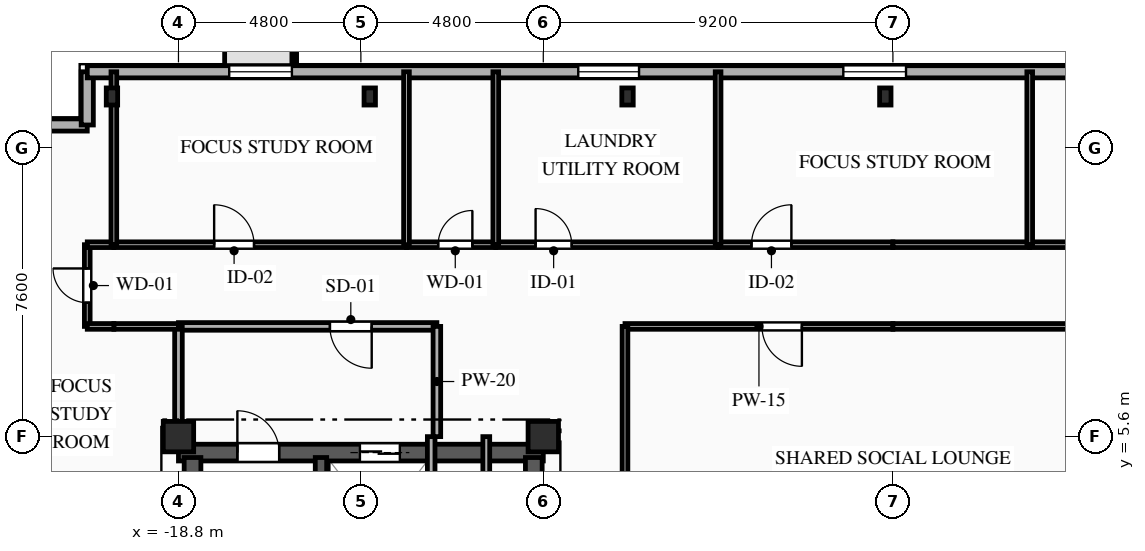
"""IFC4 building model, lengths in metres.
Left out: names, types, materials, properties, quantities, classifications, styles, units other than length and angle.
Written with IfcOpenShell. Run it as: python <this file> out.ifc"""

import sys

from ifc_helpers import new_model, si_unit, direction, frame, frame_2d, origin, origin_2d, place, context, subcontext, project, spatial, rectangle, i_section, extrude, element, fill, save


model = new_model("IFC4")
c1 = context("Model", 3, precision=1e-05, world=origin(), true_north=direction((0.0, 1.0)))
c2 = subcontext(c1, "Body", "Model", "MODEL_VIEW")
j1 = project(units=[si_unit("LENGTHUNIT", "METRE"), si_unit("PLANEANGLEUNIT", "RADIAN")], contexts=[c1])
p1 = place(None, origin())
s1 = spatial("IfcSite", under=j1, at=p1, CompositionType="ELEMENT")
p2 = place(p1, origin())
s2 = spatial("IfcBuilding", under=s1, at=p2, CompositionType="ELEMENT")
p3 = place(p2, frame((0.0, 0.0, 258.45)))
s3 = spatial("IfcBuildingStorey", under=s2, at=p3, CompositionType="ELEMENT", Elevation=258.45)
for number, where, z_axis, x_axis in (
    (1, (-18.8, 5.6, 0.0), (0.0, 0.0, 1.0), (1.0, 0.0, 0.0)),
    (2, (-9.2, 5.6, 0.0), (0.0, 0.0, 1.0), (1.0, 0.0, 0.0)),
):
    element("IfcColumn", number, at=place(p3, frame(where, z_axis=z_axis, x_axis=x_axis)), inside=s3, PredefinedType="COLUMN", context=c2, shape_type="SweptSolid", body=[
        extrude(rectangle(XDim=0.8, YDim=0.8, at=origin_2d()), origin(), (0.0, 0.0, 1.0), 3.35),
    ])
for number, where, z_axis, x_axis in (
    (3, (-0.2, 14.55, 0.0), (0.0, 0.0, 1.0), (1.0, 0.0, 0.0)),
    (4, (-6.983, 14.55, 0.0), (0.0, 0.0, 1.0), (1.0, 0.0, 0.0)),
    (5, (-13.767, 14.55, 0.0), (0.0, 0.0, 1.0), (1.0, 0.0, 0.0)),
    (6, (-20.55, 14.55, 0.0), (0.0, 0.0, 1.0), (1.0, 0.0, 0.0)),
):
    element("IfcColumn", number, at=place(p3, frame(where, z_axis=z_axis, x_axis=x_axis)), inside=s3, PredefinedType="COLUMN", context=c2, shape_type="SweptSolid", body=[
        extrude(i_section(OverallWidth=0.3, OverallDepth=0.45, WebThickness=0.014, FlangeThickness=0.026, FilletRadius=0.027, at=origin_2d()), origin(), (0.0, 0.0, 1.0), 3.35),
    ])
p4 = place(p3, frame((-22.6, 13.8, 0.0), z_axis=(0.0, 0.0, 1.0), x_axis=(1.0, 0.0, 0.0)))
e7 = element("IfcWall", 7, at=p4, inside=s3, PredefinedType="SOLIDWALL", context=c2, shape_type="SweptSolid", body=[
    extrude(rectangle(XDim=1.4, YDim=0.32, at=frame_2d((0.7, 0.0))), origin(), (0.0, 0.0, 1.0), 3.03),
])
p5 = place(p3, frame((-21.2, 13.8, 0.0), z_axis=(0.0, 0.0, 1.0), x_axis=(0.0, 1.0, 0.0)))
e8 = element("IfcWall", 8, at=p5, inside=s3, PredefinedType="SOLIDWALL", context=c2, shape_type="SweptSolid", body=[
    extrude(rectangle(XDim=1.4, YDim=0.32, at=frame_2d((0.7, 0.0))), origin(), (0.0, 0.0, 1.0), 3.03),
])
p6 = place(p3, frame((-21.2, 15.2, 0.0), z_axis=(0.0, 0.0, 1.0), x_axis=(1.0, 0.0, 0.0)))
e9 = element("IfcWall", 9, at=p6, inside=s3, PredefinedType="SOLIDWALL", context=c2, shape_type="SweptSolid", body=[
    extrude(rectangle(XDim=42.0, YDim=0.32, at=frame_2d((21.0, 0.0))), origin(), (0.0, 0.0, 1.0), 3.03),
])
p7 = place(p6, frame((3.735, 0.0, 0.85)))
e10 = element("IfcOpeningElement", 10, at=p7, cuts=e9, PredefinedType="OPENING", context=c2, shape_type="SweptSolid", body=[
    extrude(rectangle(XDim=1.65, YDim=1.85, at=frame_2d((0.825, 0.925))), frame((0.0, 0.17, 0.0), z_axis=(0.0, -1.0, 0.0), x_axis=(1.0, 0.0, 0.0)), (0.0, 0.0, 1.0), 0.34),
])
p8 = place(p6, frame((12.92, 0.0, 0.85)))
e11 = element("IfcOpeningElement", 11, at=p8, cuts=e9, PredefinedType="OPENING", context=c2, shape_type="SweptSolid", body=[
    extrude(rectangle(XDim=1.6, YDim=1.85, at=frame_2d((0.8, 0.925))), frame((0.0, 0.17, 0.0), z_axis=(0.0, -1.0, 0.0), x_axis=(1.0, 0.0, 0.0)), (0.0, 0.0, 1.0), 0.34),
])
p9 = place(p6, frame((19.895, 0.0, 0.85)))
e12 = element("IfcOpeningElement", 12, at=p9, cuts=e9, PredefinedType="OPENING", context=c2, shape_type="SweptSolid", body=[
    extrude(rectangle(XDim=1.65, YDim=1.85, at=frame_2d((0.825, 0.925))), frame((0.0, 0.17, 0.0), z_axis=(0.0, -1.0, 0.0), x_axis=(1.0, 0.0, 0.0)), (0.0, 0.0, 1.0), 0.34),
])
p10 = place(p6, frame((28.095, 0.0, 0.85)))
e13 = element("IfcOpeningElement", 13, at=p10, cuts=e9, PredefinedType="OPENING", context=c2, shape_type="SweptSolid", body=[
    extrude(rectangle(XDim=1.65, YDim=1.85, at=frame_2d((0.825, 0.925))), frame((0.0, 0.17, 0.0), z_axis=(0.0, -1.0, 0.0), x_axis=(1.0, 0.0, 0.0)), (0.0, 0.0, 1.0), 0.34),
])
p11 = place(p6, frame((36.495, 0.0, 0.85)))
e14 = element("IfcOpeningElement", 14, at=p11, cuts=e9, PredefinedType="OPENING", context=c2, shape_type="SweptSolid", body=[
    extrude(rectangle(XDim=1.65, YDim=1.85, at=frame_2d((0.825, 0.925))), frame((0.0, 0.17, 0.0), z_axis=(0.0, -1.0, 0.0), x_axis=(1.0, 0.0, 0.0)), (0.0, 0.0, 1.0), 0.34),
])
p12 = place(p3, frame((-18.8, 5.18, 0.0), z_axis=(0.0, 0.0, 1.0), x_axis=(1.0, 0.0, 0.0)))
e15 = element("IfcWall", 15, at=p12, inside=s3, PredefinedType="SHEAR", context=c2, shape_type="SweptSolid", body=[
    extrude(rectangle(XDim=9.6, YDim=0.44, at=frame_2d((4.8, 0.0))), origin(), (0.0, 0.0, 1.0), 3.03),
])
p13 = place(p12, frame((1.55, 0.0, 0.0)))
e16 = element("IfcOpeningElement", 16, at=p13, cuts=e15, PredefinedType="OPENING", context=c2, shape_type="SweptSolid", body=[
    extrude(rectangle(XDim=1.1, YDim=2.15, at=frame_2d((0.55, 1.075))), frame((0.0, 0.23, 0.0), z_axis=(0.0, -1.0, 0.0), x_axis=(1.0, 0.0, 0.0)), (0.0, 0.0, 1.0), 0.46),
])
p14 = place(p12, frame((4.775, 0.0, 0.0)))
e17 = element("IfcOpeningElement", 17, at=p14, cuts=e15, PredefinedType="OPENING", context=c2, shape_type="SweptSolid", body=[
    extrude(rectangle(XDim=1.05, YDim=2.1, at=frame_2d((0.525, 1.05))), frame((0.0, 0.23, 0.0), z_axis=(0.0, -1.0, 0.0), x_axis=(1.0, 0.0, 0.0)), (0.0, 0.0, 1.0), 0.46),
])
p15 = place(p3, frame((-18.43, -5.05, 0.0), z_axis=(0.0, 0.0, 1.0), x_axis=(0.0, 1.0, 0.0)))
e18 = element("IfcWall", 18, at=p15, inside=s3, PredefinedType="SHEAR", context=c2, shape_type="SweptSolid", body=[
    extrude(rectangle(XDim=10.1, YDim=0.44, at=frame_2d((5.05, 0.0))), origin(), (0.0, 0.0, 1.0), 3.03),
])
p16 = place(p3, frame((-9.45, -5.05, 0.0), z_axis=(0.0, 0.0, 1.0), x_axis=(0.0, 1.0, 0.0)))
e19 = element("IfcWall", 19, at=p16, inside=s3, PredefinedType="SHEAR", context=c2, shape_type="SweptSolid", body=[
    extrude(rectangle(XDim=10.1, YDim=0.44, at=frame_2d((5.05, 0.0))), origin(), (0.0, 0.0, 1.0), 3.03),
])
p17 = place(p16, frame((7.15, 0.0, 0.0)))
e20 = element("IfcOpeningElement", 20, at=p17, cuts=e19, PredefinedType="OPENING", context=c2, shape_type="SweptSolid", body=[
    extrude(rectangle(XDim=0.9, YDim=2.1, at=frame_2d((0.45, 1.05))), frame((0.0, 0.23, 0.0), z_axis=(0.0, -1.0, 0.0), x_axis=(1.0, 0.0, 0.0)), (0.0, 0.0, 1.0), 0.46),
])
p18 = place(p16, frame((2.4, 0.0, 0.0)))
e21 = element("IfcOpeningElement", 21, at=p18, cuts=e19, PredefinedType="OPENING", context=c2, shape_type="SweptSolid", body=[
    extrude(rectangle(XDim=1.2, YDim=2.15, at=frame_2d((0.6, 1.075))), frame((0.0, 0.23, 0.0), z_axis=(0.0, -1.0, 0.0), x_axis=(1.0, 0.0, 0.0)), (0.0, 0.0, 1.0), 0.46),
])
p19 = place(p16, frame((0.35, 0.0, 0.0)))
e22 = element("IfcOpeningElement", 22, at=p19, cuts=e19, PredefinedType="OPENING", context=c2, shape_type="SweptSolid", body=[
    extrude(rectangle(XDim=0.9, YDim=2.1, at=frame_2d((0.45, 1.05))), frame((0.0, 0.23, 0.0), z_axis=(0.0, -1.0, 0.0), x_axis=(1.0, 0.0, 0.0)), (0.0, 0.0, 1.0), 0.46),
])
p20 = place(p16, frame((5.0, 0.0, 0.0)))
e23 = element("IfcOpeningElement", 23, at=p20, cuts=e19, PredefinedType="OPENING", context=c2, shape_type="SweptSolid", body=[
    extrude(rectangle(XDim=0.9, YDim=2.1, at=frame_2d((0.45, 1.05))), frame((0.0, 0.23, 0.0), z_axis=(0.0, -1.0, 0.0), x_axis=(1.0, 0.0, 0.0)), (0.0, 0.0, 1.0), 0.46),
])
p21 = place(p3, frame((-15.05, -5.05, 0.0), z_axis=(0.0, 0.0, 1.0), x_axis=(0.0, 1.0, 0.0)))
e24 = element("IfcWall", 24, at=p21, inside=s3, PredefinedType="SHEAR", context=c2, shape_type="SweptSolid", body=[
    extrude(rectangle(XDim=10.1, YDim=0.3, at=frame_2d((5.05, 0.0))), origin(), (0.0, 0.0, 1.0), 3.03),
])
p22 = place(p3, frame((-12.15, 1.55, 0.0), z_axis=(0.0, 0.0, 1.0), x_axis=(0.0, 1.0, 0.0)))
e25 = element("IfcWall", 25, at=p22, inside=s3, PredefinedType="PARTITIONING", context=c2, shape_type="SweptSolid", body=[
    extrude(rectangle(XDim=4.05, YDim=0.2, at=frame_2d((2.025, 0.0))), origin(), (0.0, 0.0, 1.0), 3.03),
])
p23 = place(p3, frame((-12.0, 8.5, 0.0), z_axis=(0.0, 0.0, 1.0), x_axis=(-1.0, 0.0, 0.0)))
e26 = element("IfcWall", 26, at=p23, inside=s3, PredefinedType="PARTITIONING", context=c2, shape_type="SweptSolid", body=[
    extrude(rectangle(XDim=6.8, YDim=0.2, at=frame_2d((3.4, 0.0))), origin(), (0.0, 0.0, 1.0), 3.03),
])
p24 = place(p23, frame((1.715, 0.0, 0.0)))
e27 = element("IfcOpeningElement", 27, at=p24, cuts=e26, PredefinedType="OPENING", context=c2, shape_type="SweptSolid", body=[
    extrude(rectangle(XDim=1.1, YDim=2.15, at=frame_2d((0.55, 1.075))), frame((0.0, 0.11, 0.0), z_axis=(0.0, -1.0, 0.0), x_axis=(1.0, 0.0, 0.0)), (0.0, 0.0, 1.0), 0.22),
])
p25 = place(p3, frame((-12.0, 5.6, 0.0), z_axis=(0.0, 0.0, 1.0), x_axis=(0.0, 1.0, 0.0)))
e28 = element("IfcWall", 28, at=p25, inside=s3, PredefinedType="PARTITIONING", context=c2, shape_type="SweptSolid", body=[
    extrude(rectangle(XDim=2.9, YDim=0.2, at=frame_2d((1.45, 0.0))), origin(), (0.0, 0.0, 1.0), 3.03),
])
p26 = place(p3, frame((-18.8, 8.5, 0.0), z_axis=(0.0, 0.0, 1.0), x_axis=(0.0, -1.0, 0.0)))
e29 = element("IfcWall", 29, at=p26, inside=s3, PredefinedType="PARTITIONING", context=c2, shape_type="SweptSolid", body=[
    extrude(rectangle(XDim=2.9, YDim=0.2, at=frame_2d((1.45, 0.0))), origin(), (0.0, 0.0, 1.0), 2.655),
])
p27 = place(p3, frame((-10.7, 5.6, 0.0), z_axis=(0.0, 0.0, 1.0), x_axis=(0.0, -1.0, 0.0)))
e30 = element("IfcWall", 30, at=p27, inside=s3, PredefinedType="PARTITIONING", context=c2, shape_type="SweptSolid", body=[
    extrude(rectangle(XDim=4.05, YDim=0.18, at=frame_2d((2.025, 0.0))), origin(), (0.0, 0.0, 1.0), 3.03),
])
p28 = place(p27, frame((1.325, 0.0, 0.0)))
e31 = element("IfcOpeningElement", 31, at=p28, cuts=e30, PredefinedType="OPENING", context=c2, shape_type="SweptSolid", body=[
    extrude(rectangle(XDim=1.25, YDim=2.2, at=frame_2d((0.625, 1.1))), frame((0.0, 0.1, 0.0), z_axis=(0.0, -1.0, 0.0), x_axis=(1.0, 0.0, 0.0)), (0.0, 0.0, 1.0), 0.2),
])
p29 = place(p3, frame((-21.2, 8.5, 0.0), z_axis=(0.0, 0.0, 1.0), x_axis=(0.0, 1.0, 0.0)))
e32 = element("IfcWall", 32, at=p29, inside=s3, PredefinedType="PARTITIONING", context=c2, shape_type="SweptSolid", body=[
    extrude(rectangle(XDim=2.15, YDim=0.15, at=frame_2d((1.075, 0.0))), origin(), (0.0, 0.0, 1.0), 2.685),
])
p30 = place(p29, frame((0.625, 0.0, 0.0)))
e33 = element("IfcOpeningElement", 33, at=p30, cuts=e32, PredefinedType="OPENING", context=c2, shape_type="SweptSolid", body=[
    extrude(rectangle(XDim=0.9, YDim=2.1, at=frame_2d((0.45, 1.05))), frame((0.0, 0.085, 0.0), z_axis=(0.0, -1.0, 0.0), x_axis=(1.0, 0.0, 0.0)), (0.0, 0.0, 1.0), 0.17),
])
p31 = place(p3, frame((-18.8, 8.5, 0.0), z_axis=(0.0, 0.0, 1.0), x_axis=(-1.0, 0.0, 0.0)))
e34 = element("IfcWall", 34, at=p31, inside=s3, PredefinedType="PARTITIONING", context=c2, shape_type="SweptSolid", body=[
    extrude(rectangle(XDim=1.7, YDim=0.15, at=frame_2d((0.85, 0.0))), origin(), (0.0, 0.0, 1.0), 3.03),
])
for number, where, z_axis, x_axis in (
    (35, (-20.5, 8.5, 0.0), (0.0, 0.0, 1.0), (-1.0, 0.0, 0.0)),
    (36, (-21.2, 10.65, 0.0), (0.0, 0.0, 1.0), (1.0, 0.0, 0.0)),
):
    element("IfcWall", number, at=place(p3, frame(where, z_axis=z_axis, x_axis=x_axis)), inside=s3, PredefinedType="PARTITIONING", context=c2, shape_type="SweptSolid", body=[
        extrude(rectangle(XDim=0.7, YDim=0.15, at=frame_2d((0.35, 0.0))), origin(), (0.0, 0.0, 1.0), 3.03),
    ])
p32 = place(p3, frame((-20.5, 10.65, 0.0), z_axis=(0.0, 0.0, 1.0), x_axis=(1.0, 0.0, 0.0)))
e37 = element("IfcWall", 37, at=p32, inside=s3, PredefinedType="PARTITIONING", context=c2, shape_type="SweptSolid", body=[
    extrude(rectangle(XDim=7.7, YDim=0.15, at=frame_2d((3.85, 0.0))), origin(), (0.0, 0.0, 1.0), 3.03),
])
p33 = place(p32, frame((2.639, 0.0, 0.0)))
e38 = element("IfcOpeningElement", 38, at=p33, cuts=e37, PredefinedType="OPENING", context=c2, shape_type="SweptSolid", body=[
    extrude(rectangle(XDim=1.05, YDim=2.15, at=frame_2d((0.525, 1.075))), frame((0.0, 0.085, 0.0), z_axis=(0.0, -1.0, 0.0), x_axis=(1.0, 0.0, 0.0)), (0.0, 0.0, 1.0), 0.17),
])
p34 = place(p3, frame((-12.8, 10.65, 0.0), z_axis=(0.0, 0.0, 1.0), x_axis=(1.0, 0.0, 0.0)))
e39 = element("IfcWall", 39, at=p34, inside=s3, PredefinedType="PLUMBINGWALL", context=c2, shape_type="SweptSolid", body=[
    extrude(rectangle(XDim=2.35, YDim=0.15, at=frame_2d((1.175, 0.0))), origin(), (0.0, 0.0, 1.0), 3.03),
])
p35 = place(p34, frame((0.834, 0.0, 0.0)))
e40 = element("IfcOpeningElement", 40, at=p35, cuts=e39, PredefinedType="OPENING", context=c2, shape_type="SweptSolid", body=[
    extrude(rectangle(XDim=0.9, YDim=2.1, at=frame_2d((0.45, 1.05))), frame((0.0, 0.085, 0.0), z_axis=(0.0, -1.0, 0.0), x_axis=(1.0, 0.0, 0.0)), (0.0, 0.0, 1.0), 0.17),
])
p36 = place(p3, frame((-10.45, 10.65, 0.0), z_axis=(0.0, 0.0, 1.0), x_axis=(1.0, 0.0, 0.0)))
e41 = element("IfcWall", 41, at=p36, inside=s3, PredefinedType="PARTITIONING", context=c2, shape_type="SweptSolid", body=[
    extrude(rectangle(XDim=5.85, YDim=0.15, at=frame_2d((2.925, 0.0))), origin(), (0.0, 0.0, 1.0), 3.03),
])
p37 = place(p36, frame((1.048, 0.0, 0.0)))
e42 = element("IfcOpeningElement", 42, at=p37, cuts=e41, PredefinedType="OPENING", context=c2, shape_type="SweptSolid", body=[
    extrude(rectangle(XDim=0.95, YDim=2.1, at=frame_2d((0.475, 1.05))), frame((0.0, 0.085, 0.0), z_axis=(0.0, -1.0, 0.0), x_axis=(1.0, 0.0, 0.0)), (0.0, 0.0, 1.0), 0.17),
])
p38 = place(p3, frame((-4.6, 10.65, 0.0), z_axis=(0.0, 0.0, 1.0), x_axis=(1.0, 0.0, 0.0)))
e43 = element("IfcWall", 43, at=p38, inside=s3, PredefinedType="PARTITIONING", context=c2, shape_type="SweptSolid", body=[
    extrude(rectangle(XDim=4.6, YDim=0.15, at=frame_2d((2.3, 0.0))), origin(), (0.0, 0.0, 1.0), 3.03),
])
p39 = place(p38, frame((0.879, 0.0, 0.0)))
e44 = element("IfcOpeningElement", 44, at=p39, cuts=e43, PredefinedType="OPENING", context=c2, shape_type="SweptSolid", body=[
    extrude(rectangle(XDim=1.05, YDim=2.15, at=frame_2d((0.525, 1.075))), frame((0.0, 0.085, 0.0), z_axis=(0.0, -1.0, 0.0), x_axis=(1.0, 0.0, 0.0)), (0.0, 0.0, 1.0), 0.17),
])
p40 = place(p3, frame((0.0, 8.5, 0.0), z_axis=(0.0, 0.0, 1.0), x_axis=(-1.0, 0.0, 0.0)))
e45 = element("IfcWall", 45, at=p40, inside=s3, PredefinedType="PARTITIONING", context=c2, shape_type="SweptSolid", body=[
    extrude(rectangle(XDim=7.05, YDim=0.15, at=frame_2d((3.525, 0.0))), origin(), (0.0, 0.0, 1.0), 3.03),
])
p41 = place(p40, frame((2.395, 0.0, 0.0)))
e46 = element("IfcOpeningElement", 46, at=p41, cuts=e45, PredefinedType="OPENING", context=c2, shape_type="SweptSolid", body=[
    extrude(rectangle(XDim=1.05, YDim=2.15, at=frame_2d((0.525, 1.075))), frame((0.0, 0.085, 0.0), z_axis=(0.0, -1.0, 0.0), x_axis=(1.0, 0.0, 0.0)), (0.0, 0.0, 1.0), 0.17),
])
p42 = place(p3, frame((0.0, 10.65, 0.0), z_axis=(0.0, 0.0, 1.0), x_axis=(1.0, 0.0, 0.0)))
e47 = element("IfcWall", 47, at=p42, inside=s3, PredefinedType="PARTITIONING", context=c2, shape_type="SweptSolid", body=[
    extrude(rectangle(XDim=3.6, YDim=0.15, at=frame_2d((1.8, 0.0))), origin(), (0.0, 0.0, 1.0), 3.03),
])
p43 = place(p3, frame((3.6, 10.65, 0.0), z_axis=(0.0, 0.0, 1.0), x_axis=(1.0, 0.0, 0.0)))
e48 = element("IfcWall", 48, at=p43, inside=s3, PredefinedType="PARTITIONING", context=c2, shape_type="SweptSolid", body=[
    extrude(rectangle(XDim=8.2, YDim=0.15, at=frame_2d((4.1, 0.0))), origin(), (0.0, 0.0, 1.0), 3.03),
])
p44 = place(p43, frame((5.821, 0.0, 0.0)))
e49 = element("IfcOpeningElement", 49, at=p44, cuts=e48, PredefinedType="OPENING", context=c2, shape_type="SweptSolid", body=[
    extrude(rectangle(XDim=1.05, YDim=2.15, at=frame_2d((0.525, 1.075))), frame((0.0, 0.085, 0.0), z_axis=(0.0, -1.0, 0.0), x_axis=(1.0, 0.0, 0.0)), (0.0, 0.0, 1.0), 0.17),
])
for number, where, z_axis, x_axis in (
    (50, (7.05, 8.5, 0.0), (0.0, 0.0, 1.0), (-1.0, 0.0, 0.0)),
    (51, (-7.05, 8.5, 0.0), (0.0, 0.0, 1.0), (0.0, -1.0, 0.0)),
):
    element("IfcWall", number, at=place(p3, frame(where, z_axis=z_axis, x_axis=x_axis)), inside=s3, PredefinedType="PARTITIONING", context=c2, shape_type="SweptSolid", body=[
        extrude(rectangle(XDim=7.05, YDim=0.15, at=frame_2d((3.525, 0.0))), origin(), (0.0, 0.0, 1.0), 3.03),
    ])
p45 = place(p3, frame((-20.5, 15.2, 0.0), z_axis=(0.0, 0.0, 1.0), x_axis=(0.0, -1.0, 0.0)))
e52 = element("IfcWall", 52, at=p45, inside=s3, PredefinedType="PARTITIONING", context=c2, shape_type="SweptSolid", body=[
    extrude(rectangle(XDim=4.55, YDim=0.15, at=frame_2d((2.275, 0.0))), origin(), (0.0, 0.0, 1.0), 2.655),
])
for number, where, z_axis, x_axis in (
    (53, (-12.8, 15.2, 0.0), (0.0, 0.0, 1.0), (0.0, -1.0, 0.0)),
    (54, (-10.45, 15.2, 0.0), (0.0, 0.0, 1.0), (0.0, -1.0, 0.0)),
):
    element("IfcWall", number, at=place(p3, frame(where, z_axis=z_axis, x_axis=x_axis)), inside=s3, PredefinedType="PLUMBINGWALL", context=c2, shape_type="SweptSolid", body=[
        extrude(rectangle(XDim=4.55, YDim=0.15, at=frame_2d((2.275, 0.0))), origin(), (0.0, 0.0, 1.0), 3.03),
    ])
for number, where, z_axis, x_axis in (
    (55, (-4.6, 15.2, 0.0), (0.0, 0.0, 1.0), (0.0, -1.0, 0.0)),
    (56, (3.6, 15.2, 0.0), (0.0, 0.0, 1.0), (0.0, -1.0, 0.0)),
):
    element("IfcWall", number, at=place(p3, frame(where, z_axis=z_axis, x_axis=x_axis)), inside=s3, PredefinedType="PARTITIONING", context=c2, shape_type="SweptSolid", body=[
        extrude(rectangle(XDim=4.55, YDim=0.15, at=frame_2d((2.275, 0.0))), origin(), (0.0, 0.0, 1.0), 3.03),
    ])
p46 = place(p7, origin())
e57 = element("IfcWindow", 57, at=p46, inside=s3, PartitioningType="SINGLE_PANEL", PredefinedType="WINDOW", context=c2, shape_type="SweptSolid", body=[
    extrude(rectangle(XDim=1.65, YDim=1.85, at=frame_2d((0.825, 0.925))), frame((0.0, 0.03, 0.0), z_axis=(0.0, -1.0, 0.0), x_axis=(1.0, 0.0, 0.0)), (0.0, 0.0, 1.0), 0.06),
])
fill(e10, e57)
p47 = place(p8, origin())
e58 = element("IfcWindow", 58, at=p47, inside=s3, PartitioningType="SINGLE_PANEL", PredefinedType="WINDOW", context=c2, shape_type="SweptSolid", body=[
    extrude(rectangle(XDim=1.6, YDim=1.85, at=frame_2d((0.8, 0.925))), frame((0.0, 0.03, 0.0), z_axis=(0.0, -1.0, 0.0), x_axis=(1.0, 0.0, 0.0)), (0.0, 0.0, 1.0), 0.06),
])
fill(e11, e58)
p48 = place(p9, origin())
e59 = element("IfcWindow", 59, at=p48, inside=s3, PartitioningType="SINGLE_PANEL", PredefinedType="WINDOW", context=c2, shape_type="SweptSolid", body=[
    extrude(rectangle(XDim=1.65, YDim=1.85, at=frame_2d((0.825, 0.925))), frame((0.0, 0.03, 0.0), z_axis=(0.0, -1.0, 0.0), x_axis=(1.0, 0.0, 0.0)), (0.0, 0.0, 1.0), 0.06),
])
fill(e12, e59)
p49 = place(p13, origin())
e60 = element("IfcDoor", 60, at=p49, inside=s3, OperationType="SINGLE_SWING_LEFT", PredefinedType="DOOR", context=c2, shape_type="SweptSolid", body=[
    extrude(rectangle(XDim=1.1, YDim=2.15, at=frame_2d((0.55, 1.075))), frame((0.0, 0.025, 0.0), z_axis=(0.0, -1.0, 0.0), x_axis=(1.0, 0.0, 0.0)), (0.0, 0.0, 1.0), 0.05),
])
fill(e16, e60)
p50 = place(p14, origin())
e61 = element("IfcDoor", 61, at=p50, inside=s3, OperationType="DOUBLE_DOOR_SLIDING", PredefinedType="DOOR", context=c2, shape_type="SweptSolid", body=[
    extrude(rectangle(XDim=1.05, YDim=2.1, at=frame_2d((0.525, 1.05))), frame((0.0, 0.025, 0.0), z_axis=(0.0, -1.0, 0.0), x_axis=(1.0, 0.0, 0.0)), (0.0, 0.0, 1.0), 0.05),
])
fill(e17, e61)
p51 = place(p24, origin())
e62 = element("IfcDoor", 62, at=p51, inside=s3, OperationType="SINGLE_SWING_LEFT", PredefinedType="DOOR", context=c2, shape_type="SweptSolid", body=[
    extrude(rectangle(XDim=1.1, YDim=2.15, at=frame_2d((0.55, 1.075))), frame((0.0, 0.025, 0.0), z_axis=(0.0, -1.0, 0.0), x_axis=(1.0, 0.0, 0.0)), (0.0, 0.0, 1.0), 0.05),
])
fill(e27, e62)
p52 = place(p30, origin())
e63 = element("IfcDoor", 63, at=p52, inside=s3, OperationType="SINGLE_SWING_RIGHT", PredefinedType="DOOR", context=c2, shape_type="SweptSolid", body=[
    extrude(rectangle(XDim=0.9, YDim=2.1, at=frame_2d((0.45, 1.05))), frame((0.0, 0.025, 0.0), z_axis=(0.0, -1.0, 0.0), x_axis=(1.0, 0.0, 0.0)), (0.0, 0.0, 1.0), 0.05),
])
fill(e33, e63)
p53 = place(p33, origin())
e64 = element("IfcDoor", 64, at=p53, inside=s3, OperationType="SINGLE_SWING_LEFT", PredefinedType="DOOR", context=c2, shape_type="SweptSolid", body=[
    extrude(rectangle(XDim=1.05, YDim=2.15, at=frame_2d((0.525, 1.075))), frame((0.0, 0.025, 0.0), z_axis=(0.0, -1.0, 0.0), x_axis=(1.0, 0.0, 0.0)), (0.0, 0.0, 1.0), 0.05),
])
fill(e38, e64)
p54 = place(p35, origin())
e65 = element("IfcDoor", 65, at=p54, inside=s3, OperationType="SINGLE_SWING_RIGHT", PredefinedType="DOOR", context=c2, shape_type="SweptSolid", body=[
    extrude(rectangle(XDim=0.9, YDim=2.1, at=frame_2d((0.45, 1.05))), frame((0.0, 0.025, 0.0), z_axis=(0.0, -1.0, 0.0), x_axis=(1.0, 0.0, 0.0)), (0.0, 0.0, 1.0), 0.05),
])
fill(e40, e65)
p55 = place(p37, origin())
e66 = element("IfcDoor", 66, at=p55, inside=s3, OperationType="SINGLE_SWING_LEFT", PredefinedType="DOOR", context=c2, shape_type="SweptSolid", body=[
    extrude(rectangle(XDim=0.95, YDim=2.1, at=frame_2d((0.475, 1.05))), frame((0.0, 0.025, 0.0), z_axis=(0.0, -1.0, 0.0), x_axis=(1.0, 0.0, 0.0)), (0.0, 0.0, 1.0), 0.05),
])
fill(e42, e66)
p56 = place(p39, origin())
e67 = element("IfcDoor", 67, at=p56, inside=s3, OperationType="SINGLE_SWING_RIGHT", PredefinedType="DOOR", context=c2, shape_type="SweptSolid", body=[
    extrude(rectangle(XDim=1.05, YDim=2.15, at=frame_2d((0.525, 1.075))), frame((0.0, 0.025, 0.0), z_axis=(0.0, -1.0, 0.0), x_axis=(1.0, 0.0, 0.0)), (0.0, 0.0, 1.0), 0.05),
])
fill(e44, e67)
p57 = place(p41, origin())
e68 = element("IfcDoor", 68, at=p57, inside=s3, OperationType="SINGLE_SWING_LEFT", PredefinedType="DOOR", context=c2, shape_type="SweptSolid", body=[
    extrude(rectangle(XDim=1.05, YDim=2.15, at=frame_2d((0.525, 1.075))), frame((0.0, 0.025, 0.0), z_axis=(0.0, -1.0, 0.0), x_axis=(1.0, 0.0, 0.0)), (0.0, 0.0, 1.0), 0.05),
])
fill(e46, e68)
save(model, sys.argv[1])
